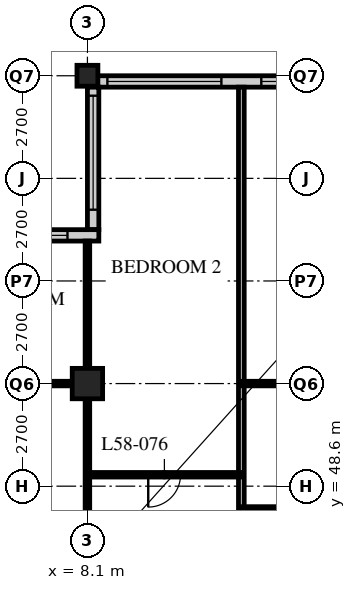
"""IFC4 building model, lengths in metres.
Left out: names, types, materials, properties, quantities, classifications, styles, units other than length and angle.
Written with IfcOpenShell. Run it as: python <this file> out.ifc"""

import sys

from ifc_helpers import new_model, si_unit, direction, frame, frame_2d, origin, origin_2d, place, context, subcontext, project, spatial, rectangle, hollow_rectangle, extrude, element, fill, save


model = new_model("IFC4")
c1 = context("Model", 3, precision=1e-05, world=origin(), true_north=direction((0.0, 1.0)))
c2 = subcontext(c1, "Body", "Model", "MODEL_VIEW")
j1 = project(units=[si_unit("LENGTHUNIT", "METRE"), si_unit("PLANEANGLEUNIT", "RADIAN")], contexts=[c1])
p1 = place(None, origin())
s1 = spatial("IfcSite", under=j1, at=p1, CompositionType="ELEMENT")
p2 = place(p1, origin())
s2 = spatial("IfcBuilding", under=s1, at=p2, CompositionType="ELEMENT")
p3 = place(p2, frame((0.0, 0.0, 224.4)))
s3 = spatial("IfcBuildingStorey", under=s2, at=p3, CompositionType="ELEMENT", Elevation=224.4)
p4 = place(p3, frame((8.1, 51.3, 0.0), z_axis=(0.0, 0.0, 1.0), x_axis=(1.0, 0.0, 0.0)))
e1 = element("IfcColumn", 1, at=p4, inside=s3, PredefinedType="COLUMN", context=c2, shape_type="SweptSolid", body=[
    extrude(hollow_rectangle(XDim=0.8, YDim=0.8, WallThickness=0.08, at=origin_2d()), origin(), (0.0, 0.0, 1.0), 3.6),
])
p5 = place(p3, frame((8.1, 59.4, 0.0), z_axis=(0.0, 0.0, 1.0), x_axis=(1.0, 0.0, 0.0)))
e2 = element("IfcColumn", 2, at=p5, inside=s3, PredefinedType="COLUMN", context=c2, shape_type="SweptSolid", body=[
    extrude(hollow_rectangle(XDim=0.55, YDim=0.55, WallThickness=0.045, at=origin_2d()), origin(), (0.0, 0.0, 1.0), 3.6),
])
p6 = place(p3, frame((48.3, 59.25, 0.0), z_axis=(0.0, 0.0, 1.0), x_axis=(-1.0, 0.0, 0.0)))
e3 = element("IfcWall", 3, at=p6, inside=s3, PredefinedType="SOLIDWALL", context=c2, shape_type="SweptSolid", body=[
    extrude(rectangle(XDim=40.2, YDim=0.3, at=frame_2d((20.1, 0.0))), origin(), (0.0, 0.0, 1.0), 3.39),
])
p7 = place(p6, frame((0.225, 0.0, 0.6)))
e4 = element("IfcOpeningElement", 4, at=p7, cuts=e3, PredefinedType="OPENING", context=c2, shape_type="SweptSolid", body=[
    extrude(rectangle(XDim=3.0, YDim=2.0, at=frame_2d((1.5, 1.0))), frame((0.0, 0.16, 0.0), z_axis=(0.0, -1.0, 0.0), x_axis=(1.0, 0.0, 0.0)), (0.0, 0.0, 1.0), 0.32),
])
p8 = place(p6, frame((4.275, 0.0, 0.6)))
e5 = element("IfcOpeningElement", 5, at=p8, cuts=e3, PredefinedType="OPENING", context=c2, shape_type="SweptSolid", body=[
    extrude(rectangle(XDim=3.0, YDim=2.0, at=frame_2d((1.5, 1.0))), frame((0.0, 0.16, 0.0), z_axis=(0.0, -1.0, 0.0), x_axis=(1.0, 0.0, 0.0)), (0.0, 0.0, 1.0), 0.32),
])
p9 = place(p6, frame((8.325, 0.0, 0.6)))
e6 = element("IfcOpeningElement", 6, at=p9, cuts=e3, PredefinedType="OPENING", context=c2, shape_type="SweptSolid", body=[
    extrude(rectangle(XDim=3.0, YDim=2.0, at=frame_2d((1.5, 1.0))), frame((0.0, 0.16, 0.0), z_axis=(0.0, -1.0, 0.0), x_axis=(1.0, 0.0, 0.0)), (0.0, 0.0, 1.0), 0.32),
])
p10 = place(p6, frame((12.375, 0.0, 0.6)))
e7 = element("IfcOpeningElement", 7, at=p10, cuts=e3, PredefinedType="OPENING", context=c2, shape_type="SweptSolid", body=[
    extrude(rectangle(XDim=3.0, YDim=2.0, at=frame_2d((1.5, 1.0))), frame((0.0, 0.16, 0.0), z_axis=(0.0, -1.0, 0.0), x_axis=(1.0, 0.0, 0.0)), (0.0, 0.0, 1.0), 0.32),
])
p11 = place(p6, frame((16.425, 0.0, 0.6)))
e8 = element("IfcOpeningElement", 8, at=p11, cuts=e3, PredefinedType="OPENING", context=c2, shape_type="SweptSolid", body=[
    extrude(rectangle(XDim=3.0, YDim=2.0, at=frame_2d((1.5, 1.0))), frame((0.0, 0.16, 0.0), z_axis=(0.0, -1.0, 0.0), x_axis=(1.0, 0.0, 0.0)), (0.0, 0.0, 1.0), 0.32),
])
p12 = place(p6, frame((20.475, 0.0, 0.6)))
e9 = element("IfcOpeningElement", 9, at=p12, cuts=e3, PredefinedType="OPENING", context=c2, shape_type="SweptSolid", body=[
    extrude(rectangle(XDim=3.0, YDim=2.0, at=frame_2d((1.5, 1.0))), frame((0.0, 0.16, 0.0), z_axis=(0.0, -1.0, 0.0), x_axis=(1.0, 0.0, 0.0)), (0.0, 0.0, 1.0), 0.32),
])
p13 = place(p6, frame((24.525, 0.0, 0.6)))
e10 = element("IfcOpeningElement", 10, at=p13, cuts=e3, PredefinedType="OPENING", context=c2, shape_type="SweptSolid", body=[
    extrude(rectangle(XDim=3.0, YDim=2.0, at=frame_2d((1.5, 1.0))), frame((0.0, 0.16, 0.0), z_axis=(0.0, -1.0, 0.0), x_axis=(1.0, 0.0, 0.0)), (0.0, 0.0, 1.0), 0.32),
])
p14 = place(p6, frame((28.575, 0.0, 0.6)))
e11 = element("IfcOpeningElement", 11, at=p14, cuts=e3, PredefinedType="OPENING", context=c2, shape_type="SweptSolid", body=[
    extrude(rectangle(XDim=3.0, YDim=2.0, at=frame_2d((1.5, 1.0))), frame((0.0, 0.16, 0.0), z_axis=(0.0, -1.0, 0.0), x_axis=(1.0, 0.0, 0.0)), (0.0, 0.0, 1.0), 0.32),
])
p15 = place(p6, frame((32.625, 0.0, 0.6)))
e12 = element("IfcOpeningElement", 12, at=p15, cuts=e3, PredefinedType="OPENING", context=c2, shape_type="SweptSolid", body=[
    extrude(rectangle(XDim=3.0, YDim=2.0, at=frame_2d((1.5, 1.0))), frame((0.0, 0.16, 0.0), z_axis=(0.0, -1.0, 0.0), x_axis=(1.0, 0.0, 0.0)), (0.0, 0.0, 1.0), 0.32),
])
p16 = place(p6, frame((36.675, 0.0, 0.6)))
e13 = element("IfcOpeningElement", 13, at=p16, cuts=e3, PredefinedType="OPENING", context=c2, shape_type="SweptSolid", body=[
    extrude(rectangle(XDim=3.0, YDim=2.0, at=frame_2d((1.5, 1.0))), frame((0.0, 0.16, 0.0), z_axis=(0.0, -1.0, 0.0), x_axis=(1.0, 0.0, 0.0)), (0.0, 0.0, 1.0), 0.32),
])
p17 = place(p3, frame((8.25, 59.1, 0.0), z_axis=(0.0, 0.0, 1.0), x_axis=(0.0, -1.0, 0.0)))
e14 = element("IfcWall", 14, at=p17, inside=s3, PredefinedType="SOLIDWALL", context=c2, shape_type="SweptSolid", body=[
    extrude(rectangle(XDim=3.75, YDim=0.3, at=frame_2d((1.875, 0.0))), origin(), (0.0, 0.0, 1.0), 3.39),
])
p18 = place(p17, frame((0.225, 0.0, 0.6)))
e15 = element("IfcOpeningElement", 15, at=p18, cuts=e14, PredefinedType="OPENING", context=c2, shape_type="SweptSolid", body=[
    extrude(rectangle(XDim=3.0, YDim=2.0, at=frame_2d((1.5, 1.0))), frame((0.0, 0.16, 0.0), z_axis=(0.0, -1.0, 0.0), x_axis=(1.0, 0.0, 0.0)), (0.0, 0.0, 1.0), 0.32),
])
p19 = place(p3, frame((8.4, 55.2, 0.0), z_axis=(0.0, 0.0, 1.0), x_axis=(-1.0, 0.0, 0.0)))
e16 = element("IfcWall", 16, at=p19, inside=s3, PredefinedType="SOLIDWALL", context=c2, shape_type="SweptSolid", body=[
    extrude(rectangle(XDim=4.35, YDim=0.3, at=frame_2d((2.175, 0.0))), origin(), (0.0, 0.0, 1.0), 3.39),
])
p20 = place(p19, frame((0.825, 0.0, 0.6)))
e17 = element("IfcOpeningElement", 17, at=p20, cuts=e16, PredefinedType="OPENING", context=c2, shape_type="SweptSolid", body=[
    extrude(rectangle(XDim=3.0, YDim=2.0, at=frame_2d((1.5, 1.0))), frame((0.0, 0.16, 0.0), z_axis=(0.0, -1.0, 0.0), x_axis=(1.0, 0.0, 0.0)), (0.0, 0.0, 1.0), 0.32),
])
p21 = place(p3, frame((8.1, 45.6, 0.0), z_axis=(0.0, 0.0, 1.0), x_axis=(0.0, 1.0, 0.0)))
e18 = element("IfcWall", 18, at=p21, inside=s3, PredefinedType="PARTITIONING", context=c2, shape_type="SweptSolid", body=[
    extrude(rectangle(XDim=9.45, YDim=0.12, at=frame_2d((4.725, 0.0))), origin(), (0.0, 0.0, 1.0), 2.628),
])
p22 = place(p3, frame((8.1, 51.3, 0.0), z_axis=(0.0, 0.0, 1.0), x_axis=(-1.0, 0.0, 0.0)))
e19 = element("IfcWall", 19, at=p22, inside=s3, PredefinedType="PARTITIONING", context=c2, shape_type="SweptSolid", body=[
    extrude(rectangle(XDim=3.75, YDim=0.12, at=frame_2d((1.875, 0.0))), origin(), (0.0, 0.0, 1.0), 2.628),
])
p23 = place(p22, frame((1.875, 0.0, 0.0)))
e20 = element("IfcOpeningElement", 20, at=p23, cuts=e19, PredefinedType="OPENING", context=c2, shape_type="SweptSolid", body=[
    extrude(rectangle(XDim=0.85, YDim=2.1, at=frame_2d((0.425, 1.05))), frame((0.0, 0.07, 0.0), z_axis=(0.0, -1.0, 0.0), x_axis=(1.0, 0.0, 0.0)), (0.0, 0.0, 1.0), 0.14),
])
p24 = place(p3, frame((12.15, 43.2, 0.0), z_axis=(0.0, 0.0, 1.0), x_axis=(0.0, 1.0, 0.0)))
e21 = element("IfcWall", 21, at=p24, inside=s3, PredefinedType="PARTITIONING", context=c2, shape_type="SweptSolid", body=[
    extrude(rectangle(XDim=15.9, YDim=0.15, at=frame_2d((7.95, 0.0))), origin(), (0.0, 0.0, 1.0), 3.39),
])
p25 = place(p3, frame((12.15, 48.0, 0.0), z_axis=(0.0, 0.0, 1.0), x_axis=(1.0, 0.0, 0.0)))
e22 = element("IfcWall", 22, at=p25, inside=s3, PredefinedType="PARTITIONING", context=c2, shape_type="SweptSolid", body=[
    extrude(rectangle(XDim=8.1, YDim=0.12, at=frame_2d((4.05, 0.0))), origin(), (0.0, 0.0, 1.0), 3.39),
])
p26 = place(p25, frame((3.625, 0.0, 0.0)))
e23 = element("IfcOpeningElement", 23, at=p26, cuts=e22, PredefinedType="OPENING", context=c2, shape_type="SweptSolid", body=[
    extrude(rectangle(XDim=0.85, YDim=2.1, at=frame_2d((0.425, 1.05))), frame((0.0, 0.07, 0.0), z_axis=(0.0, -1.0, 0.0), x_axis=(1.0, 0.0, 0.0)), (0.0, 0.0, 1.0), 0.14),
])
p27 = place(p3, frame((8.1, 48.9, 0.0), z_axis=(0.0, 0.0, 1.0), x_axis=(1.0, 0.0, 0.0)))
e24 = element("IfcWall", 24, at=p27, inside=s3, PredefinedType="PARTITIONING", context=c2, shape_type="SweptSolid", body=[
    extrude(rectangle(XDim=4.05, YDim=0.12, at=frame_2d((2.025, 0.0))), origin(), (0.0, 0.0, 1.0), 3.39),
])
p28 = place(p27, frame((1.6, 0.0, 0.0)))
e25 = element("IfcOpeningElement", 25, at=p28, cuts=e24, PredefinedType="OPENING", context=c2, shape_type="SweptSolid", body=[
    extrude(rectangle(XDim=0.85, YDim=2.1, at=frame_2d((0.425, 1.05))), frame((0.0, 0.07, 0.0), z_axis=(0.0, -1.0, 0.0), x_axis=(1.0, 0.0, 0.0)), (0.0, 0.0, 1.0), 0.14),
])
p29 = place(p3, frame((12.15, 51.3, 0.0), z_axis=(0.0, 0.0, 1.0), x_axis=(1.0, 0.0, 0.0)))
e26 = element("IfcWall", 26, at=p29, inside=s3, PredefinedType="PARTITIONING", context=c2, shape_type="SweptSolid", body=[
    extrude(rectangle(XDim=3.65, YDim=0.12, at=frame_2d((1.825, 0.0))), origin(), (0.0, 0.0, 1.0), 2.628),
])
p30 = place(p15, origin())
e27 = element("IfcWindow", 27, at=p30, inside=s3, PartitioningType="SINGLE_PANEL", PredefinedType="WINDOW", context=c2, shape_type="SweptSolid", body=[
    extrude(rectangle(XDim=3.0, YDim=2.0, at=frame_2d((1.5, 1.0))), frame((0.0, 0.03, 0.0), z_axis=(0.0, -1.0, 0.0), x_axis=(1.0, 0.0, 0.0)), (0.0, 0.0, 1.0), 0.06),
])
fill(e12, e27)
p31 = place(p16, origin())
e28 = element("IfcWindow", 28, at=p31, inside=s3, PartitioningType="SINGLE_PANEL", PredefinedType="WINDOW", context=c2, shape_type="SweptSolid", body=[
    extrude(rectangle(XDim=3.0, YDim=2.0, at=frame_2d((1.5, 1.0))), frame((0.0, 0.03, 0.0), z_axis=(0.0, -1.0, 0.0), x_axis=(1.0, 0.0, 0.0)), (0.0, 0.0, 1.0), 0.06),
])
fill(e13, e28)
p32 = place(p18, origin())
e29 = element("IfcWindow", 29, at=p32, inside=s3, PartitioningType="SINGLE_PANEL", PredefinedType="WINDOW", context=c2, shape_type="SweptSolid", body=[
    extrude(rectangle(XDim=3.0, YDim=2.0, at=frame_2d((1.5, 1.0))), frame((0.0, 0.03, 0.0), z_axis=(0.0, -1.0, 0.0), x_axis=(1.0, 0.0, 0.0)), (0.0, 0.0, 1.0), 0.06),
])
fill(e15, e29)
p33 = place(p20, origin())
e30 = element("IfcWindow", 30, at=p33, inside=s3, PartitioningType="SINGLE_PANEL", PredefinedType="WINDOW", context=c2, shape_type="SweptSolid", body=[
    extrude(rectangle(XDim=3.0, YDim=2.0, at=frame_2d((1.5, 1.0))), frame((0.0, 0.03, 0.0), z_axis=(0.0, -1.0, 0.0), x_axis=(1.0, 0.0, 0.0)), (0.0, 0.0, 1.0), 0.06),
])
fill(e17, e30)
p34 = place(p28, origin())
e31 = element("IfcDoor", 31, at=p34, inside=s3, OperationType="SINGLE_SWING_RIGHT", PredefinedType="DOOR", context=c2, shape_type="SweptSolid", body=[
    extrude(rectangle(XDim=0.85, YDim=2.1, at=frame_2d((0.425, 1.05))), frame((0.0, 0.025, 0.0), z_axis=(0.0, -1.0, 0.0), x_axis=(1.0, 0.0, 0.0)), (0.0, 0.0, 1.0), 0.05),
])
fill(e25, e31)
save(model, sys.argv[1])
